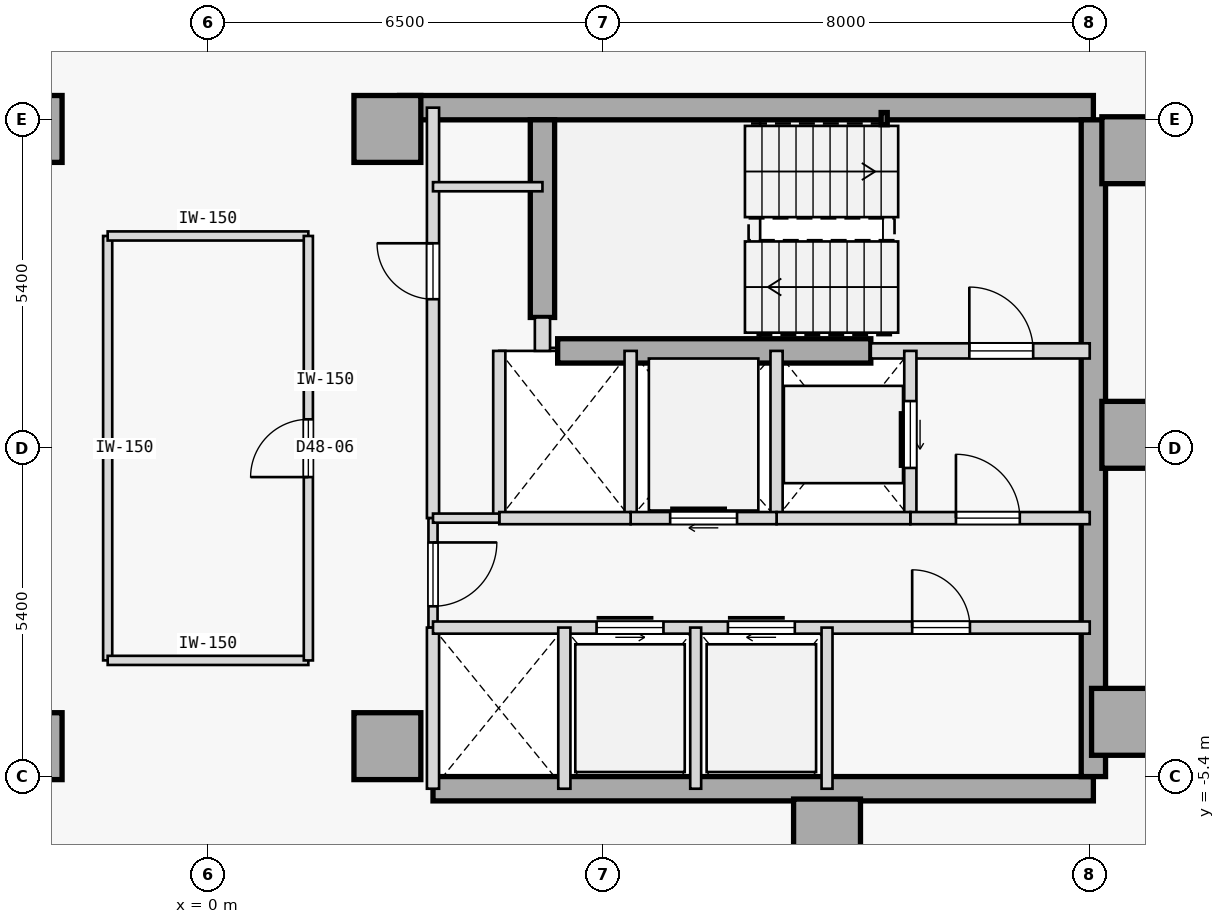
"""IFC4 building model, lengths in metres.
Left out: names, types, materials, properties, quantities, classifications, styles, units other than length and angle.
Written with IfcOpenShell. Run it as: python <this file> out.ifc"""

import sys

from ifc_helpers import new_model, si_unit, direction, frame, frame_2d, origin, origin_2d, place, context, subcontext, project, spatial, rectangle, hollow_rectangle, extrude, element, fill, save


model = new_model("IFC4")
c1 = context("Model", 3, precision=1e-05, world=origin(), true_north=direction((0.0, 1.0)))
c2 = subcontext(c1, "Body", "Model", "MODEL_VIEW")
j1 = project(units=[si_unit("LENGTHUNIT", "METRE"), si_unit("PLANEANGLEUNIT", "RADIAN")], contexts=[c1])
p1 = place(None, origin())
s1 = spatial("IfcSite", under=j1, at=p1, CompositionType="ELEMENT")
p2 = place(p1, origin())
s2 = spatial("IfcBuilding", under=s1, at=p2, CompositionType="ELEMENT")
p3 = place(p2, frame((0.0, 0.0, 185.4)))
s3 = spatial("IfcBuildingStorey", under=s2, at=p3, CompositionType="ELEMENT", Elevation=185.4)
for number, where, z_axis, x_axis in (
    (1, (-2.95, -4.9, 0.0), (0.0, 0.0, 1.0), (1.0, 0.0, 0.0)),
    (2, (-2.95, 5.25, 0.0), (0.0, 0.0, 1.0), (1.0, 0.0, 0.0)),
    (3, (15.25, 4.9, 0.0), (0.0, 0.0, 1.0), (1.0, 0.0, 0.0)),
    (4, (15.25, 0.22, 0.0), (0.0, 0.0, 1.0), (1.0, 0.0, 0.0)),
    (5, (15.08, -4.5, 0.0), (0.0, 0.0, 1.0), (1.0, 0.0, 0.0)),
    (6, (10.18, -6.32, 0.0), (0.0, 0.0, 1.0), (1.0, 0.0, 0.0)),
    (7, (2.95, -4.9, 0.0), (0.0, 0.0, 1.0), (1.0, 0.0, 0.0)),
    (8, (2.95, 5.25, 0.0), (0.0, 0.0, 1.0), (1.0, 0.0, 0.0)),
):
    element("IfcColumn", number, at=place(p3, frame(where, z_axis=z_axis, x_axis=x_axis)), inside=s3, PredefinedType="COLUMN", context=c2, shape_type="SweptSolid", body=[
        extrude(rectangle(XDim=1.1, YDim=1.1, at=origin_2d()), origin(), (0.0, 0.0, 1.0), 3.4),
    ])
p4 = place(p3, frame((3.15, 5.6, 0.0), z_axis=(0.0, 0.0, 1.0), x_axis=(1.0, 0.0, 0.0)))
e9 = element("IfcWall", 9, at=p4, inside=s3, PredefinedType="SHEAR", context=c2, shape_type="SweptSolid", body=[
    extrude(rectangle(XDim=11.41, YDim=0.4, at=frame_2d((5.705, 0.0))), origin(), (0.0, 0.0, 1.0), 3.175),
])
p5 = place(p3, frame((3.7, -5.6, 0.0), z_axis=(0.0, 0.0, 1.0), x_axis=(1.0, 0.0, 0.0)))
e10 = element("IfcWall", 10, at=p5, inside=s3, PredefinedType="SHEAR", context=c2, shape_type="SweptSolid", body=[
    extrude(rectangle(XDim=10.86, YDim=0.4, at=frame_2d((5.43, 0.0))), origin(), (0.0, 0.0, 1.0), 3.175),
])
p6 = place(p3, frame((14.56, -5.4, 0.0), z_axis=(0.0, 0.0, 1.0), x_axis=(0.0, 1.0, 0.0)))
e11 = element("IfcWall", 11, at=p6, inside=s3, PredefinedType="SHEAR", context=c2, shape_type="SweptSolid", body=[
    extrude(rectangle(XDim=10.8, YDim=0.4, at=frame_2d((5.4, 0.0))), origin(), (0.0, 0.0, 1.0), 3.175),
])
p7 = place(p3, frame((5.5, 2.15, 0.0), z_axis=(0.0, 0.0, 1.0), x_axis=(0.0, 1.0, 0.0)))
e12 = element("IfcWall", 12, at=p7, inside=s3, PredefinedType="SHEAR", context=c2, shape_type="SweptSolid", body=[
    extrude(rectangle(XDim=3.25, YDim=0.4, at=frame_2d((1.625, 0.0))), origin(), (0.0, 0.0, 1.0), 3.175),
])
p8 = place(p3, frame((5.75, 1.6, 0.0), z_axis=(0.0, 0.0, 1.0), x_axis=(1.0, 0.0, 0.0)))
e13 = element("IfcWall", 13, at=p8, inside=s3, PredefinedType="SHEAR", context=c2, shape_type="SweptSolid", body=[
    extrude(rectangle(XDim=5.15, YDim=0.4, at=frame_2d((2.575, 0.0))), origin(), (0.0, 0.0, 1.0), 3.175),
])
p9 = place(p3, frame((11.12, 5.42, 0.0), z_axis=(0.0, 0.0, 1.0), x_axis=(1.0, 0.0, 0.0)))
e14 = element("IfcColumn", 14, at=p9, inside=s3, PredefinedType="COLUMN", context=c2, shape_type="SweptSolid", body=[
    extrude(hollow_rectangle(XDim=0.1, YDim=0.2, WallThickness=0.008, at=origin_2d()), origin(), (0.0, 0.0, 1.0), 3.4),
])
p10 = place(p3, frame((10.9, 1.6, 0.0), z_axis=(0.0, 0.0, 1.0), x_axis=(1.0, 0.0, 0.0)))
e15 = element("IfcWall", 15, at=p10, inside=s3, PredefinedType="STANDARD", context=c2, shape_type="SweptSolid", body=[
    extrude(rectangle(XDim=3.6, YDim=0.25, at=frame_2d((1.8, 0.0))), origin(), (0.0, 0.0, 1.0), 3.175),
])
p11 = place(p10, frame((1.62, 0.0, 0.0)))
e16 = element("IfcOpeningElement", 16, at=p11, cuts=e15, PredefinedType="OPENING", context=c2, shape_type="SweptSolid", body=[
    extrude(rectangle(XDim=1.05, YDim=2.15, at=frame_2d((0.525, 1.075))), frame((0.0, 0.135, 0.0), z_axis=(0.0, -1.0, 0.0), x_axis=(1.0, 0.0, 0.0)), (0.0, 0.0, 1.0), 0.27),
])
p12 = place(p3, frame((5.5, 1.6, 0.0), z_axis=(0.0, 0.0, 1.0), x_axis=(0.0, 1.0, 0.0)))
e17 = element("IfcWall", 17, at=p12, inside=s3, PredefinedType="STANDARD", context=c2, shape_type="SweptSolid", body=[
    extrude(rectangle(XDim=0.55, YDim=0.25, at=frame_2d((0.275, 0.0))), origin(), (0.0, 0.0, 1.0), 3.175),
])
p13 = place(p3, frame((3.7, -1.15, 0.0), z_axis=(0.0, 0.0, 1.0), x_axis=(0.0, 1.0, 0.0)))
e18 = element("IfcWall", 18, at=p13, inside=s3, PredefinedType="STANDARD", context=c2, shape_type="SweptSolid", body=[
    extrude(rectangle(XDim=6.75, YDim=0.2, at=frame_2d((3.375, 0.0))), origin(), (0.0, 0.0, 1.0), 3.175),
])
p14 = place(p13, frame((3.6, 0.0, 0.0)))
e19 = element("IfcOpeningElement", 19, at=p14, cuts=e18, PredefinedType="OPENING", context=c2, shape_type="SweptSolid", body=[
    extrude(rectangle(XDim=0.92, YDim=2.15, at=frame_2d((0.46, 1.075))), frame((0.0, 0.11, 0.0), z_axis=(0.0, -1.0, 0.0), x_axis=(1.0, 0.0, 0.0)), (0.0, 0.0, 1.0), 0.22),
])
p15 = place(p3, frame((3.7, -2.95, 0.0), z_axis=(0.0, 0.0, 1.0), x_axis=(0.0, 1.0, 0.0)))
e20 = element("IfcWall", 20, at=p15, inside=s3, PredefinedType="PARTITIONING", context=c2, shape_type="SweptSolid", body=[
    extrude(rectangle(XDim=1.8, YDim=0.15, at=frame_2d((0.9, 0.0))), origin(), (0.0, 0.0, 1.0), 3.175),
])
p16 = place(p15, frame((0.35, 0.0, 0.0)))
e21 = element("IfcOpeningElement", 21, at=p16, cuts=e20, PredefinedType="OPENING", context=c2, shape_type="SweptSolid", body=[
    extrude(rectangle(XDim=1.05, YDim=2.18, at=frame_2d((0.525, 1.09))), frame((0.0, 0.085, 0.0), z_axis=(0.0, -1.0, 0.0), x_axis=(1.0, 0.0, 0.0)), (0.0, 0.0, 1.0), 0.17),
])
p17 = place(p3, frame((3.7, -5.6, 0.0), z_axis=(0.0, 0.0, 1.0), x_axis=(0.0, 1.0, 0.0)))
e22 = element("IfcWall", 22, at=p17, inside=s3, PredefinedType="STANDARD", context=c2, shape_type="SweptSolid", body=[
    extrude(rectangle(XDim=2.65, YDim=0.2, at=frame_2d((1.325, 0.0))), origin(), (0.0, 0.0, 1.0), 3.175),
])
p18 = place(p3, frame((11.55, -1.15, 0.0), z_axis=(0.0, 0.0, 1.0), x_axis=(0.0, 1.0, 0.0)))
e23 = element("IfcWall", 23, at=p18, inside=s3, PredefinedType="STANDARD", context=c2, shape_type="SweptSolid", body=[
    extrude(rectangle(XDim=2.75, YDim=0.2, at=frame_2d((1.375, 0.0))), origin(), (0.0, 0.0, 1.0), 3.175),
])
p19 = place(p18, frame((0.825, 0.0, 0.0)))
e24 = element("IfcOpeningElement", 24, at=p19, cuts=e23, PredefinedType="OPENING", context=c2, shape_type="SweptSolid", body=[
    extrude(rectangle(XDim=1.1, YDim=2.15, at=frame_2d((0.55, 1.075))), frame((0.0, 0.11, 0.0), z_axis=(0.0, -1.0, 0.0), x_axis=(1.0, 0.0, 0.0)), (0.0, 0.0, 1.0), 0.22),
])
p20 = place(p3, frame((9.35, -1.15, 0.0), z_axis=(0.0, 0.0, 1.0), x_axis=(0.0, 1.0, 0.0)))
e25 = element("IfcWall", 25, at=p20, inside=s3, PredefinedType="STANDARD", context=c2, shape_type="SweptSolid", body=[
    extrude(rectangle(XDim=2.75, YDim=0.2, at=frame_2d((1.375, 0.0))), origin(), (0.0, 0.0, 1.0), 3.175),
])
p21 = place(p3, frame((11.55, -1.15, 0.0), z_axis=(0.0, 0.0, 1.0), x_axis=(1.0, 0.0, 0.0)))
e26 = element("IfcWall", 26, at=p21, inside=s3, PredefinedType="STANDARD", context=c2, shape_type="SweptSolid", body=[
    extrude(rectangle(XDim=2.95, YDim=0.2, at=frame_2d((1.475, 0.0))), origin(), (0.0, 0.0, 1.0), 3.175),
])
p22 = place(p21, frame((0.75, 0.0, 0.0)))
e27 = element("IfcOpeningElement", 27, at=p22, cuts=e26, PredefinedType="OPENING", context=c2, shape_type="SweptSolid", body=[
    extrude(rectangle(XDim=1.05, YDim=2.18, at=frame_2d((0.525, 1.09))), frame((0.0, 0.11, 0.0), z_axis=(0.0, -1.0, 0.0), x_axis=(1.0, 0.0, 0.0)), (0.0, 0.0, 1.0), 0.22),
])
p23 = place(p3, frame((9.35, -1.15, 0.0), z_axis=(0.0, 0.0, 1.0), x_axis=(1.0, 0.0, 0.0)))
e28 = element("IfcWall", 28, at=p23, inside=s3, PredefinedType="STANDARD", context=c2, shape_type="SweptSolid", body=[
    extrude(rectangle(XDim=2.2, YDim=0.2, at=frame_2d((1.1, 0.0))), origin(), (0.0, 0.0, 1.0), 3.175),
])
p24 = place(p3, frame((6.95, -1.15, 0.0), z_axis=(0.0, 0.0, 1.0), x_axis=(0.0, 1.0, 0.0)))
e29 = element("IfcWall", 29, at=p24, inside=s3, PredefinedType="STANDARD", context=c2, shape_type="SweptSolid", body=[
    extrude(rectangle(XDim=2.75, YDim=0.2, at=frame_2d((1.375, 0.0))), origin(), (0.0, 0.0, 1.0), 3.175),
])
p25 = place(p3, frame((6.95, -1.15, 0.0), z_axis=(0.0, 0.0, 1.0), x_axis=(1.0, 0.0, 0.0)))
e30 = element("IfcWall", 30, at=p25, inside=s3, PredefinedType="STANDARD", context=c2, shape_type="SweptSolid", body=[
    extrude(rectangle(XDim=2.4, YDim=0.2, at=frame_2d((1.2, 0.0))), origin(), (0.0, 0.0, 1.0), 3.175),
])
p26 = place(p25, frame((0.65, 0.0, 0.0)))
e31 = element("IfcOpeningElement", 31, at=p26, cuts=e30, PredefinedType="OPENING", context=c2, shape_type="SweptSolid", body=[
    extrude(rectangle(XDim=1.1, YDim=2.15, at=frame_2d((0.55, 1.075))), frame((0.0, 0.11, 0.0), z_axis=(0.0, -1.0, 0.0), x_axis=(1.0, 0.0, 0.0)), (0.0, 0.0, 1.0), 0.22),
])
p27 = place(p3, frame((4.79, -1.15, 0.0), z_axis=(0.0, 0.0, 1.0), x_axis=(0.0, 1.0, 0.0)))
e32 = element("IfcWall", 32, at=p27, inside=s3, PredefinedType="STANDARD", context=c2, shape_type="SweptSolid", body=[
    extrude(rectangle(XDim=2.75, YDim=0.2, at=frame_2d((1.375, 0.0))), origin(), (0.0, 0.0, 1.0), 3.175),
])
p28 = place(p3, frame((4.79, -1.15, 0.0), z_axis=(0.0, 0.0, 1.0), x_axis=(1.0, 0.0, 0.0)))
e33 = element("IfcWall", 33, at=p28, inside=s3, PredefinedType="STANDARD", context=c2, shape_type="SweptSolid", body=[
    extrude(rectangle(XDim=2.16, YDim=0.2, at=frame_2d((1.08, 0.0))), origin(), (0.0, 0.0, 1.0), 3.175),
])
p29 = place(p3, frame((3.7, -1.15, 0.0), z_axis=(0.0, 0.0, 1.0), x_axis=(1.0, 0.0, 0.0)))
e34 = element("IfcWall", 34, at=p29, inside=s3, PredefinedType="PARTITIONING", context=c2, shape_type="SweptSolid", body=[
    extrude(rectangle(XDim=1.09, YDim=0.15, at=frame_2d((0.545, 0.0))), origin(), (0.0, 0.0, 1.0), 3.175),
])
p30 = place(p3, frame((3.7, -2.95, 0.0), z_axis=(0.0, 0.0, 1.0), x_axis=(1.0, 0.0, 0.0)))
e35 = element("IfcWall", 35, at=p30, inside=s3, PredefinedType="STANDARD", context=c2, shape_type="SweptSolid", body=[
    extrude(rectangle(XDim=10.8, YDim=0.2, at=frame_2d((5.4, 0.0))), origin(), (0.0, 0.0, 1.0), 3.175),
])
p31 = place(p30, frame((2.69, 0.0, 0.0)))
e36 = element("IfcOpeningElement", 36, at=p31, cuts=e35, PredefinedType="OPENING", context=c2, shape_type="SweptSolid", body=[
    extrude(rectangle(XDim=1.1, YDim=2.15, at=frame_2d((0.55, 1.075))), frame((0.0, 0.11, 0.0), z_axis=(0.0, -1.0, 0.0), x_axis=(1.0, 0.0, 0.0)), (0.0, 0.0, 1.0), 0.22),
])
p32 = place(p30, frame((4.85, 0.0, 0.0)))
e37 = element("IfcOpeningElement", 37, at=p32, cuts=e35, PredefinedType="OPENING", context=c2, shape_type="SweptSolid", body=[
    extrude(rectangle(XDim=1.1, YDim=2.15, at=frame_2d((0.55, 1.075))), frame((0.0, 0.11, 0.0), z_axis=(0.0, -1.0, 0.0), x_axis=(1.0, 0.0, 0.0)), (0.0, 0.0, 1.0), 0.22),
])
p33 = place(p30, frame((7.88, 0.0, 0.0)))
e38 = element("IfcOpeningElement", 38, at=p33, cuts=e35, PredefinedType="OPENING", context=c2, shape_type="SweptSolid", body=[
    extrude(rectangle(XDim=0.95, YDim=2.15, at=frame_2d((0.475, 1.075))), frame((0.0, 0.11, 0.0), z_axis=(0.0, -1.0, 0.0), x_axis=(1.0, 0.0, 0.0)), (0.0, 0.0, 1.0), 0.22),
])
p34 = place(p3, frame((5.86, -5.6, 0.0), z_axis=(0.0, 0.0, 1.0), x_axis=(0.0, 1.0, 0.0)))
e39 = element("IfcWall", 39, at=p34, inside=s3, PredefinedType="STANDARD", context=c2, shape_type="SweptSolid", body=[
    extrude(rectangle(XDim=2.65, YDim=0.2, at=frame_2d((1.325, 0.0))), origin(), (0.0, 0.0, 1.0), 3.175),
])
for number, where, z_axis, x_axis in (
    (40, (10.18, -5.6, 0.0), (0.0, 0.0, 1.0), (0.0, 1.0, 0.0)),
    (41, (8.02, -5.6, 0.0), (0.0, 0.0, 1.0), (0.0, 1.0, 0.0)),
):
    element("IfcWall", number, at=place(p3, frame(where, z_axis=z_axis, x_axis=x_axis)), inside=s3, PredefinedType="STANDARD", context=c2, shape_type="SweptSolid", body=[
        extrude(rectangle(XDim=2.65, YDim=0.18, at=frame_2d((1.325, 0.0))), origin(), (0.0, 0.0, 1.0), 3.175),
    ])
p35 = place(p3, frame((3.7, 4.3, 0.0), z_axis=(0.0, 0.0, 1.0), x_axis=(1.0, 0.0, 0.0)))
e42 = element("IfcWall", 42, at=p35, inside=s3, PredefinedType="PARTITIONING", context=c2, shape_type="SweptSolid", body=[
    extrude(rectangle(XDim=1.8, YDim=0.15, at=frame_2d((0.9, 0.0))), origin(), (0.0, 0.0, 1.0), 3.175),
])
p36 = place(p3, frame((-1.65, -3.49, 0.0), z_axis=(0.0, 0.0, 1.0), x_axis=(-3.4979712e-05, 0.999999999388, 0.0)))
e43 = element("IfcWall", 43, at=p36, inside=s3, PredefinedType="PARTITIONING", context=c2, shape_type="SweptSolid", body=[
    extrude(rectangle(XDim=6.979, YDim=0.15, at=frame_2d((3.49, 0.0))), origin(), (0.0, 0.0, 1.0), 3.175),
])
p37 = place(p3, frame((-1.65, -3.49, 0.0), z_axis=(0.0, 0.0, 1.0), x_axis=(0.999999975374, -0.000221926315, 0.0)))
e44 = element("IfcWall", 44, at=p37, inside=s3, PredefinedType="PARTITIONING", context=c2, shape_type="SweptSolid", body=[
    extrude(rectangle(XDim=3.3, YDim=0.15, at=frame_2d((1.65, 0.0))), origin(), (0.0, 0.0, 1.0), 3.175),
])
p38 = place(p3, frame((-1.65, 3.49, 0.0), z_axis=(0.0, 0.0, 1.0), x_axis=(1.0, 0.0, 0.0)))
e45 = element("IfcWall", 45, at=p38, inside=s3, PredefinedType="PARTITIONING", context=c2, shape_type="SweptSolid", body=[
    extrude(rectangle(XDim=3.3, YDim=0.15, at=frame_2d((1.65, 0.0))), origin(), (0.0, 0.0, 1.0), 3.175),
])
p39 = place(p3, frame((1.65, -3.49, 0.0), z_axis=(0.0, 0.0, 1.0), x_axis=(-6.9952083e-05, 0.999999997553, 0.0)))
e46 = element("IfcWall", 46, at=p39, inside=s3, PredefinedType="PARTITIONING", context=c2, shape_type="SweptSolid", body=[
    extrude(rectangle(XDim=6.98, YDim=0.15, at=frame_2d((3.49, 0.0))), origin(), (0.0, 0.0, 1.0), 3.175),
])
p40 = place(p39, frame((3.015, 0.0, 0.0)))
e47 = element("IfcOpeningElement", 47, at=p40, cuts=e46, PredefinedType="OPENING", context=c2, shape_type="SweptSolid", body=[
    extrude(rectangle(XDim=0.95, YDim=2.15, at=frame_2d((0.475, 1.075))), frame((0.0, 0.085, 0.0), z_axis=(0.0, -1.0, 0.0), x_axis=(1.0, 0.0, 0.0)), (0.0, 0.0, 1.0), 0.17),
])
p41 = place(p11, origin())
e48 = element("IfcDoor", 48, at=p41, inside=s3, OperationType="SINGLE_SWING_LEFT", PredefinedType="DOOR", context=c2, shape_type="SweptSolid", body=[
    extrude(rectangle(XDim=1.05, YDim=2.15, at=frame_2d((0.525, 1.075))), frame((0.0, 0.025, 0.0), z_axis=(0.0, -1.0, 0.0), x_axis=(1.0, 0.0, 0.0)), (0.0, 0.0, 1.0), 0.05),
])
fill(e16, e48)
p42 = place(p22, origin())
e49 = element("IfcDoor", 49, at=p42, inside=s3, OperationType="SINGLE_SWING_LEFT", PredefinedType="DOOR", context=c2, shape_type="SweptSolid", body=[
    extrude(rectangle(XDim=1.05, YDim=2.18, at=frame_2d((0.525, 1.09))), frame((0.0, 0.025, 0.0), z_axis=(0.0, -1.0, 0.0), x_axis=(1.0, 0.0, 0.0)), (0.0, 0.0, 1.0), 0.05),
])
fill(e27, e49)
p43 = place(p16, frame((1.05, 0.0, 0.0), z_axis=(0.0, 0.0, 1.0), x_axis=(-1.0, 0.0, 0.0)))
e50 = element("IfcDoor", 50, at=p43, inside=s3, OperationType="SINGLE_SWING_RIGHT", PredefinedType="DOOR", context=c2, shape_type="SweptSolid", body=[
    extrude(rectangle(XDim=1.05, YDim=2.18, at=frame_2d((0.525, 1.09))), frame((0.0, 0.025, 0.0), z_axis=(0.0, -1.0, 0.0), x_axis=(1.0, 0.0, 0.0)), (0.0, 0.0, 1.0), 0.05),
])
fill(e21, e50)
p44 = place(p19, origin())
e51 = element("IfcDoor", 51, at=p44, inside=s3, OperationType="SLIDING_TO_RIGHT", PredefinedType="DOOR", context=c2, shape_type="SweptSolid", body=[
    extrude(rectangle(XDim=1.1, YDim=2.15, at=frame_2d((0.55, 1.075))), frame((0.0, 0.025, 0.0), z_axis=(0.0, -1.0, 0.0), x_axis=(1.0, 0.0, 0.0)), (0.0, 0.0, 1.0), 0.05),
])
fill(e24, e51)
p45 = place(p26, origin())
e52 = element("IfcDoor", 52, at=p45, inside=s3, OperationType="SLIDING_TO_RIGHT", PredefinedType="DOOR", context=c2, shape_type="SweptSolid", body=[
    extrude(rectangle(XDim=1.1, YDim=2.15, at=frame_2d((0.55, 1.075))), frame((0.0, 0.025, 0.0), z_axis=(0.0, -1.0, 0.0), x_axis=(1.0, 0.0, 0.0)), (0.0, 0.0, 1.0), 0.05),
])
fill(e31, e52)
p46 = place(p31, origin())
e53 = element("IfcDoor", 53, at=p46, inside=s3, OperationType="SLIDING_TO_LEFT", PredefinedType="DOOR", context=c2, shape_type="SweptSolid", body=[
    extrude(rectangle(XDim=1.1, YDim=2.15, at=frame_2d((0.55, 1.075))), frame((0.0, 0.025, 0.0), z_axis=(0.0, -1.0, 0.0), x_axis=(1.0, 0.0, 0.0)), (0.0, 0.0, 1.0), 0.05),
])
fill(e36, e53)
p47 = place(p32, origin())
e54 = element("IfcDoor", 54, at=p47, inside=s3, OperationType="SLIDING_TO_RIGHT", PredefinedType="DOOR", context=c2, shape_type="SweptSolid", body=[
    extrude(rectangle(XDim=1.1, YDim=2.15, at=frame_2d((0.55, 1.075))), frame((0.0, 0.025, 0.0), z_axis=(0.0, -1.0, 0.0), x_axis=(1.0, 0.0, 0.0)), (0.0, 0.0, 1.0), 0.05),
])
fill(e37, e54)
p48 = place(p33, origin())
e55 = element("IfcDoor", 55, at=p48, inside=s3, OperationType="SINGLE_SWING_LEFT", PredefinedType="DOOR", context=c2, shape_type="SweptSolid", body=[
    extrude(rectangle(XDim=0.95, YDim=2.15, at=frame_2d((0.475, 1.075))), frame((0.0, 0.025, 0.0), z_axis=(0.0, -1.0, 0.0), x_axis=(1.0, 0.0, 0.0)), (0.0, 0.0, 1.0), 0.05),
])
fill(e38, e55)
p49 = place(p14, origin())
e56 = element("IfcDoor", 56, at=p49, inside=s3, OperationType="SINGLE_SWING_RIGHT", PredefinedType="DOOR", context=c2, shape_type="SweptSolid", body=[
    extrude(rectangle(XDim=0.92, YDim=2.15, at=frame_2d((0.46, 1.075))), frame((0.0, 0.025, 0.0), z_axis=(0.0, -1.0, 0.0), x_axis=(1.0, 0.0, 0.0)), (0.0, 0.0, 1.0), 0.05),
])
fill(e19, e56)
p50 = place(p40, origin())
e57 = element("IfcDoor", 57, at=p50, inside=s3, OperationType="SINGLE_SWING_LEFT", PredefinedType="DOOR", context=c2, shape_type="SweptSolid", body=[
    extrude(rectangle(XDim=0.95, YDim=2.15, at=frame_2d((0.475, 1.075))), frame((0.0, 0.025, 0.0), z_axis=(0.0, -1.0, 0.0), x_axis=(1.0, 0.0, 0.0)), (0.0, 0.0, 1.0), 0.05),
])
fill(e47, e57)
save(model, sys.argv[1])
